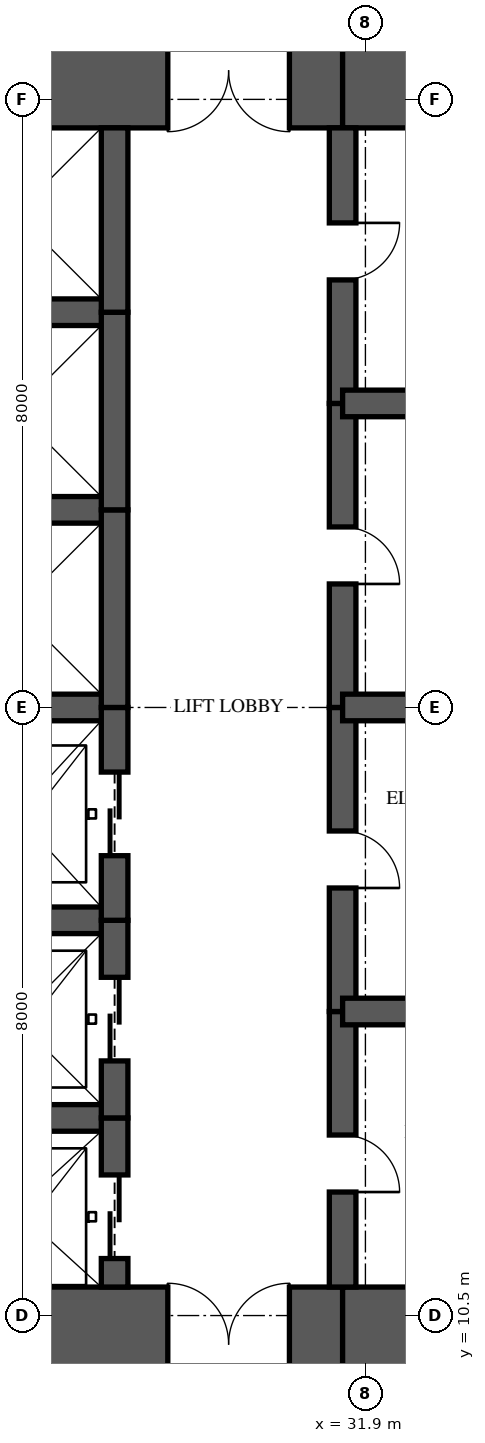
"""IFC4 building model, lengths in metres.
Left out: names, types, materials, properties, quantities, classifications, styles, units other than length and angle.
Written with IfcOpenShell. Run it as: python <this file> out.ifc"""

import sys

from ifc_helpers import new_model, si_unit, direction, frame, frame_2d, origin, place, context, subcontext, project, spatial, rectangle, extrude, element, fill, save


model = new_model("IFC4")
c1 = context("Model", 3, precision=1e-05, world=origin(), true_north=direction((0.0, 1.0)))
c2 = subcontext(c1, "Body", "Model", "MODEL_VIEW")
j1 = project(units=[si_unit("LENGTHUNIT", "METRE"), si_unit("PLANEANGLEUNIT", "RADIAN")], contexts=[c1])
p1 = place(None, origin())
s1 = spatial("IfcSite", under=j1, at=p1, CompositionType="ELEMENT")
p2 = place(p1, origin())
s2 = spatial("IfcBuilding", under=s1, at=p2, CompositionType="ELEMENT")
p3 = place(p2, frame((0.0, 0.0, 121.6)))
s3 = spatial("IfcBuildingStorey", under=s2, at=p3, CompositionType="ELEMENT", Elevation=121.6)
p4 = place(p3, frame((26.0, 10.125, 0.0), z_axis=(0.0, 0.0, 1.0), x_axis=(1.0, 0.0, 0.0)))
e1 = element("IfcWall", 1, at=p4, inside=s3, PredefinedType="SHEAR", context=c2, shape_type="SweptSolid", body=[
    extrude(rectangle(XDim=5.6, YDim=1.5, at=frame_2d((2.8, 0.0))), origin(), (0.0, 0.0, 1.0), 3.35),
])
p5 = place(p4, frame((3.3, 0.0, 0.0)))
e2 = element("IfcOpeningElement", 2, at=p5, cuts=e1, PredefinedType="OPENING", context=c2, shape_type="SweptSolid", body=[
    extrude(rectangle(XDim=1.6, YDim=2.1, at=frame_2d((0.8, 1.05))), frame((0.0, 0.76, 0.0), z_axis=(0.0, -1.0, 0.0), x_axis=(1.0, 0.0, 0.0)), (0.0, 0.0, 1.0), 1.52),
])
for number, where, z_axis, x_axis in (
    (3, (31.6, 10.125, 0.0), (0.0, 0.0, 1.0), (1.0, 0.0, 0.0)),
    (4, (35.9, 26.875, 0.0), (0.0, 0.0, 1.0), (-1.0, 0.0, 0.0)),
):
    element("IfcWall", number, at=place(p3, frame(where, z_axis=z_axis, x_axis=x_axis)), inside=s3, PredefinedType="SHEAR", context=c2, shape_type="SweptSolid", body=[
        extrude(rectangle(XDim=4.3, YDim=1.5, at=frame_2d((2.15, 0.0))), origin(), (0.0, 0.0, 1.0), 3.35),
    ])
p6 = place(p3, frame((31.6, 26.875, 0.0), z_axis=(0.0, 0.0, 1.0), x_axis=(-1.0, 0.0, 0.0)))
e5 = element("IfcWall", 5, at=p6, inside=s3, PredefinedType="SHEAR", context=c2, shape_type="SweptSolid", body=[
    extrude(rectangle(XDim=5.6, YDim=1.5, at=frame_2d((2.8, 0.0))), origin(), (0.0, 0.0, 1.0), 3.35),
])
p7 = place(p6, frame((0.7, 0.0, 0.0)))
e6 = element("IfcOpeningElement", 6, at=p7, cuts=e5, PredefinedType="OPENING", context=c2, shape_type="SweptSolid", body=[
    extrude(rectangle(XDim=1.6, YDim=2.1, at=frame_2d((0.8, 1.05))), frame((0.0, 0.76, 0.0), z_axis=(0.0, -1.0, 0.0), x_axis=(1.0, 0.0, 0.0)), (0.0, 0.0, 1.0), 1.52),
])
p8 = place(p3, frame((28.6, 10.875, 0.0), z_axis=(0.0, 0.0, 1.0), x_axis=(0.0, 1.0, 0.0)))
e7 = element("IfcWall", 7, at=p8, inside=s3, PredefinedType="SHEAR", context=c2, shape_type="SweptSolid", body=[
    extrude(rectangle(XDim=2.225, YDim=0.35, at=frame_2d((1.113, 0.0))), origin(), (0.0, 0.0, 1.0), 3.35),
])
p9 = place(p8, frame((0.375, 0.0, 0.0)))
e8 = element("IfcOpeningElement", 8, at=p9, cuts=e7, PredefinedType="OPENING", context=c2, shape_type="SweptSolid", body=[
    extrude(rectangle(XDim=1.1, YDim=2.1, at=frame_2d((0.55, 1.05))), frame((0.0, 0.185, 0.0), z_axis=(0.0, -1.0, 0.0), x_axis=(1.0, 0.0, 0.0)), (0.0, 0.0, 1.0), 0.37),
])
p10 = place(p3, frame((28.6, 13.1, 0.0), z_axis=(0.0, 0.0, 1.0), x_axis=(0.0, 1.0, 0.0)))
e9 = element("IfcWall", 9, at=p10, inside=s3, PredefinedType="SHEAR", context=c2, shape_type="SweptSolid", body=[
    extrude(rectangle(XDim=2.6, YDim=0.35, at=frame_2d((1.3, 0.0))), origin(), (0.0, 0.0, 1.0), 3.35),
])
p11 = place(p10, frame((0.75, 0.0, 0.0)))
e10 = element("IfcOpeningElement", 10, at=p11, cuts=e9, PredefinedType="OPENING", context=c2, shape_type="SweptSolid", body=[
    extrude(rectangle(XDim=1.1, YDim=2.1, at=frame_2d((0.55, 1.05))), frame((0.0, 0.185, 0.0), z_axis=(0.0, -1.0, 0.0), x_axis=(1.0, 0.0, 0.0)), (0.0, 0.0, 1.0), 0.37),
])
p12 = place(p3, frame((28.6, 15.7, 0.0), z_axis=(0.0, 0.0, 1.0), x_axis=(0.0, 1.0, 0.0)))
e11 = element("IfcWall", 11, at=p12, inside=s3, PredefinedType="SHEAR", context=c2, shape_type="SweptSolid", body=[
    extrude(rectangle(XDim=2.8, YDim=0.35, at=frame_2d((1.4, 0.0))), origin(), (0.0, 0.0, 1.0), 3.35),
])
p13 = place(p12, frame((0.85, 0.0, 0.0)))
e12 = element("IfcOpeningElement", 12, at=p13, cuts=e11, PredefinedType="OPENING", context=c2, shape_type="SweptSolid", body=[
    extrude(rectangle(XDim=1.1, YDim=2.1, at=frame_2d((0.55, 1.05))), frame((0.0, 0.185, 0.0), z_axis=(0.0, -1.0, 0.0), x_axis=(1.0, 0.0, 0.0)), (0.0, 0.0, 1.0), 0.37),
])
p14 = place(p3, frame((28.6, 18.5, 0.0), z_axis=(0.0, 0.0, 1.0), x_axis=(0.0, 1.0, 0.0)))
e13 = element("IfcWall", 13, at=p14, inside=s3, PredefinedType="SHEAR", context=c2, shape_type="SweptSolid", body=[
    extrude(rectangle(XDim=2.6, YDim=0.35, at=frame_2d((1.3, 0.0))), origin(), (0.0, 0.0, 1.0), 3.35),
])
p15 = place(p3, frame((28.6, 21.1, 0.0), z_axis=(0.0, 0.0, 1.0), x_axis=(0.0, 1.0, 0.0)))
e14 = element("IfcWall", 14, at=p15, inside=s3, PredefinedType="SHEAR", context=c2, shape_type="SweptSolid", body=[
    extrude(rectangle(XDim=2.6, YDim=0.35, at=frame_2d((1.3, 0.0))), origin(), (0.0, 0.0, 1.0), 3.35),
])
p16 = place(p3, frame((28.6, 23.7, 0.0), z_axis=(0.0, 0.0, 1.0), x_axis=(0.0, 1.0, 0.0)))
e15 = element("IfcWall", 15, at=p16, inside=s3, PredefinedType="SHEAR", context=c2, shape_type="SweptSolid", body=[
    extrude(rectangle(XDim=2.425, YDim=0.35, at=frame_2d((1.212, 0.0))), origin(), (0.0, 0.0, 1.0), 3.35),
])
p17 = place(p3, frame((31.6, 10.875, 0.0), z_axis=(0.0, 0.0, 1.0), x_axis=(0.0, 1.0, 0.0)))
e16 = element("IfcWall", 16, at=p17, inside=s3, PredefinedType="SHEAR", context=c2, shape_type="SweptSolid", body=[
    extrude(rectangle(XDim=3.625, YDim=0.35, at=frame_2d((1.812, 0.0))), origin(), (0.0, 0.0, 1.0), 3.35),
])
p18 = place(p17, frame((1.25, 0.0, 0.0)))
e17 = element("IfcOpeningElement", 17, at=p18, cuts=e16, PredefinedType="OPENING", context=c2, shape_type="SweptSolid", body=[
    extrude(rectangle(XDim=0.75, YDim=2.1, at=frame_2d((0.375, 1.05))), frame((0.0, 0.185, 0.0), z_axis=(0.0, -1.0, 0.0), x_axis=(1.0, 0.0, 0.0)), (0.0, 0.0, 1.0), 0.37),
])
p19 = place(p3, frame((31.6, 14.5, 0.0), z_axis=(0.0, 0.0, 1.0), x_axis=(0.0, 1.0, 0.0)))
e18 = element("IfcWall", 18, at=p19, inside=s3, PredefinedType="SHEAR", context=c2, shape_type="SweptSolid", body=[
    extrude(rectangle(XDim=4.0, YDim=0.35, at=frame_2d((2.0, 0.0))), origin(), (0.0, 0.0, 1.0), 3.35),
])
p20 = place(p19, frame((1.625, 0.0, 0.0)))
e19 = element("IfcOpeningElement", 19, at=p20, cuts=e18, PredefinedType="OPENING", context=c2, shape_type="SweptSolid", body=[
    extrude(rectangle(XDim=0.75, YDim=2.1, at=frame_2d((0.375, 1.05))), frame((0.0, 0.185, 0.0), z_axis=(0.0, -1.0, 0.0), x_axis=(1.0, 0.0, 0.0)), (0.0, 0.0, 1.0), 0.37),
])
p21 = place(p3, frame((31.6, 18.5, 0.0), z_axis=(0.0, 0.0, 1.0), x_axis=(0.0, 1.0, 0.0)))
e20 = element("IfcWall", 20, at=p21, inside=s3, PredefinedType="SHEAR", context=c2, shape_type="SweptSolid", body=[
    extrude(rectangle(XDim=4.0, YDim=0.35, at=frame_2d((2.0, 0.0))), origin(), (0.0, 0.0, 1.0), 3.35),
])
p22 = place(p21, frame((1.625, 0.0, 0.0)))
e21 = element("IfcOpeningElement", 21, at=p22, cuts=e20, PredefinedType="OPENING", context=c2, shape_type="SweptSolid", body=[
    extrude(rectangle(XDim=0.75, YDim=2.1, at=frame_2d((0.375, 1.05))), frame((0.0, 0.185, 0.0), z_axis=(0.0, -1.0, 0.0), x_axis=(1.0, 0.0, 0.0)), (0.0, 0.0, 1.0), 0.37),
])
p23 = place(p3, frame((31.6, 22.5, 0.0), z_axis=(0.0, 0.0, 1.0), x_axis=(0.0, 1.0, 0.0)))
e22 = element("IfcWall", 22, at=p23, inside=s3, PredefinedType="SHEAR", context=c2, shape_type="SweptSolid", body=[
    extrude(rectangle(XDim=3.625, YDim=0.35, at=frame_2d((1.812, 0.0))), origin(), (0.0, 0.0, 1.0), 3.35),
])
p24 = place(p23, frame((1.625, 0.0, 0.0)))
e23 = element("IfcOpeningElement", 23, at=p24, cuts=e22, PredefinedType="OPENING", context=c2, shape_type="SweptSolid", body=[
    extrude(rectangle(XDim=0.75, YDim=2.1, at=frame_2d((0.375, 1.05))), frame((0.0, 0.185, 0.0), z_axis=(0.0, -1.0, 0.0), x_axis=(1.0, 0.0, 0.0)), (0.0, 0.0, 1.0), 0.37),
])
for number, where, z_axis, x_axis in (
    (24, (26.0, 13.1, 0.0), (0.0, 0.0, 1.0), (1.0, 0.0, 0.0)),
    (25, (26.0, 15.7, 0.0), (0.0, 0.0, 1.0), (1.0, 0.0, 0.0)),
    (26, (26.0, 18.5, 0.0), (0.0, 0.0, 1.0), (1.0, 0.0, 0.0)),
    (27, (26.0, 21.1, 0.0), (0.0, 0.0, 1.0), (1.0, 0.0, 0.0)),
    (28, (26.0, 23.7, 0.0), (0.0, 0.0, 1.0), (1.0, 0.0, 0.0)),
):
    element("IfcWall", number, at=place(p3, frame(where, z_axis=z_axis, x_axis=x_axis)), inside=s3, PredefinedType="SHEAR", context=c2, shape_type="SweptSolid", body=[
        extrude(rectangle(XDim=2.6, YDim=0.35, at=frame_2d((1.3, 0.0))), origin(), (0.0, 0.0, 1.0), 3.35),
    ])
for number, where, z_axis, x_axis in (
    (29, (31.6, 14.5, 0.0), (0.0, 0.0, 1.0), (1.0, 0.0, 0.0)),
    (30, (31.6, 18.5, 0.0), (0.0, 0.0, 1.0), (1.0, 0.0, 0.0)),
    (31, (31.6, 22.5, 0.0), (0.0, 0.0, 1.0), (1.0, 0.0, 0.0)),
):
    element("IfcWall", number, at=place(p3, frame(where, z_axis=z_axis, x_axis=x_axis)), inside=s3, PredefinedType="SHEAR", context=c2, shape_type="SweptSolid", body=[
        extrude(rectangle(XDim=4.3, YDim=0.35, at=frame_2d((2.15, 0.0))), origin(), (0.0, 0.0, 1.0), 3.35),
    ])
p25 = place(p9, origin())
e32 = element("IfcDoor", 32, at=p25, inside=s3, OperationType="SLIDING_TO_LEFT", PredefinedType="DOOR", context=c2, shape_type="SweptSolid", body=[
    extrude(rectangle(XDim=1.1, YDim=2.1, at=frame_2d((0.55, 1.05))), frame((0.0, 0.025, 0.0), z_axis=(0.0, -1.0, 0.0), x_axis=(1.0, 0.0, 0.0)), (0.0, 0.0, 1.0), 0.05),
])
fill(e8, e32)
p26 = place(p11, origin())
e33 = element("IfcDoor", 33, at=p26, inside=s3, OperationType="SLIDING_TO_LEFT", PredefinedType="DOOR", context=c2, shape_type="SweptSolid", body=[
    extrude(rectangle(XDim=1.1, YDim=2.1, at=frame_2d((0.55, 1.05))), frame((0.0, 0.025, 0.0), z_axis=(0.0, -1.0, 0.0), x_axis=(1.0, 0.0, 0.0)), (0.0, 0.0, 1.0), 0.05),
])
fill(e10, e33)
p27 = place(p13, origin())
e34 = element("IfcDoor", 34, at=p27, inside=s3, OperationType="SLIDING_TO_LEFT", PredefinedType="DOOR", context=c2, shape_type="SweptSolid", body=[
    extrude(rectangle(XDim=1.1, YDim=2.1, at=frame_2d((0.55, 1.05))), frame((0.0, 0.025, 0.0), z_axis=(0.0, -1.0, 0.0), x_axis=(1.0, 0.0, 0.0)), (0.0, 0.0, 1.0), 0.05),
])
fill(e12, e34)
p28 = place(p5, origin())
e35 = element("IfcDoor", 35, at=p28, inside=s3, OperationType="DOUBLE_DOOR_SINGLE_SWING", PredefinedType="DOOR", context=c2, shape_type="SweptSolid", body=[
    extrude(rectangle(XDim=1.6, YDim=2.1, at=frame_2d((0.8, 1.05))), frame((0.0, 0.025, 0.0), z_axis=(0.0, -1.0, 0.0), x_axis=(1.0, 0.0, 0.0)), (0.0, 0.0, 1.0), 0.05),
])
fill(e2, e35)
p29 = place(p7, origin())
e36 = element("IfcDoor", 36, at=p29, inside=s3, OperationType="DOUBLE_DOOR_SINGLE_SWING", PredefinedType="DOOR", context=c2, shape_type="SweptSolid", body=[
    extrude(rectangle(XDim=1.6, YDim=2.1, at=frame_2d((0.8, 1.05))), frame((0.0, 0.025, 0.0), z_axis=(0.0, -1.0, 0.0), x_axis=(1.0, 0.0, 0.0)), (0.0, 0.0, 1.0), 0.05),
])
fill(e6, e36)
p30 = place(p18, frame((0.75, 0.0, 0.0), z_axis=(0.0, 0.0, 1.0), x_axis=(-1.0, 0.0, 0.0)))
e37 = element("IfcDoor", 37, at=p30, inside=s3, OperationType="SINGLE_SWING_RIGHT", PredefinedType="DOOR", context=c2, shape_type="SweptSolid", body=[
    extrude(rectangle(XDim=0.75, YDim=2.1, at=frame_2d((0.375, 1.05))), frame((0.0, 0.025, 0.0), z_axis=(0.0, -1.0, 0.0), x_axis=(1.0, 0.0, 0.0)), (0.0, 0.0, 1.0), 0.05),
])
fill(e17, e37)
p31 = place(p20, frame((0.75, 0.0, 0.0), z_axis=(0.0, 0.0, 1.0), x_axis=(-1.0, 0.0, 0.0)))
e38 = element("IfcDoor", 38, at=p31, inside=s3, OperationType="SINGLE_SWING_RIGHT", PredefinedType="DOOR", context=c2, shape_type="SweptSolid", body=[
    extrude(rectangle(XDim=0.75, YDim=2.1, at=frame_2d((0.375, 1.05))), frame((0.0, 0.025, 0.0), z_axis=(0.0, -1.0, 0.0), x_axis=(1.0, 0.0, 0.0)), (0.0, 0.0, 1.0), 0.05),
])
fill(e19, e38)
p32 = place(p22, frame((0.75, 0.0, 0.0), z_axis=(0.0, 0.0, 1.0), x_axis=(-1.0, 0.0, 0.0)))
e39 = element("IfcDoor", 39, at=p32, inside=s3, OperationType="SINGLE_SWING_RIGHT", PredefinedType="DOOR", context=c2, shape_type="SweptSolid", body=[
    extrude(rectangle(XDim=0.75, YDim=2.1, at=frame_2d((0.375, 1.05))), frame((0.0, 0.025, 0.0), z_axis=(0.0, -1.0, 0.0), x_axis=(1.0, 0.0, 0.0)), (0.0, 0.0, 1.0), 0.05),
])
fill(e21, e39)
p33 = place(p24, frame((0.75, 0.0, 0.0), z_axis=(0.0, 0.0, 1.0), x_axis=(-1.0, 0.0, 0.0)))
e40 = element("IfcDoor", 40, at=p33, inside=s3, OperationType="SINGLE_SWING_LEFT", PredefinedType="DOOR", context=c2, shape_type="SweptSolid", body=[
    extrude(rectangle(XDim=0.75, YDim=2.1, at=frame_2d((0.375, 1.05))), frame((0.0, 0.025, 0.0), z_axis=(0.0, -1.0, 0.0), x_axis=(1.0, 0.0, 0.0)), (0.0, 0.0, 1.0), 0.05),
])
fill(e23, e40)
save(model, sys.argv[1])
